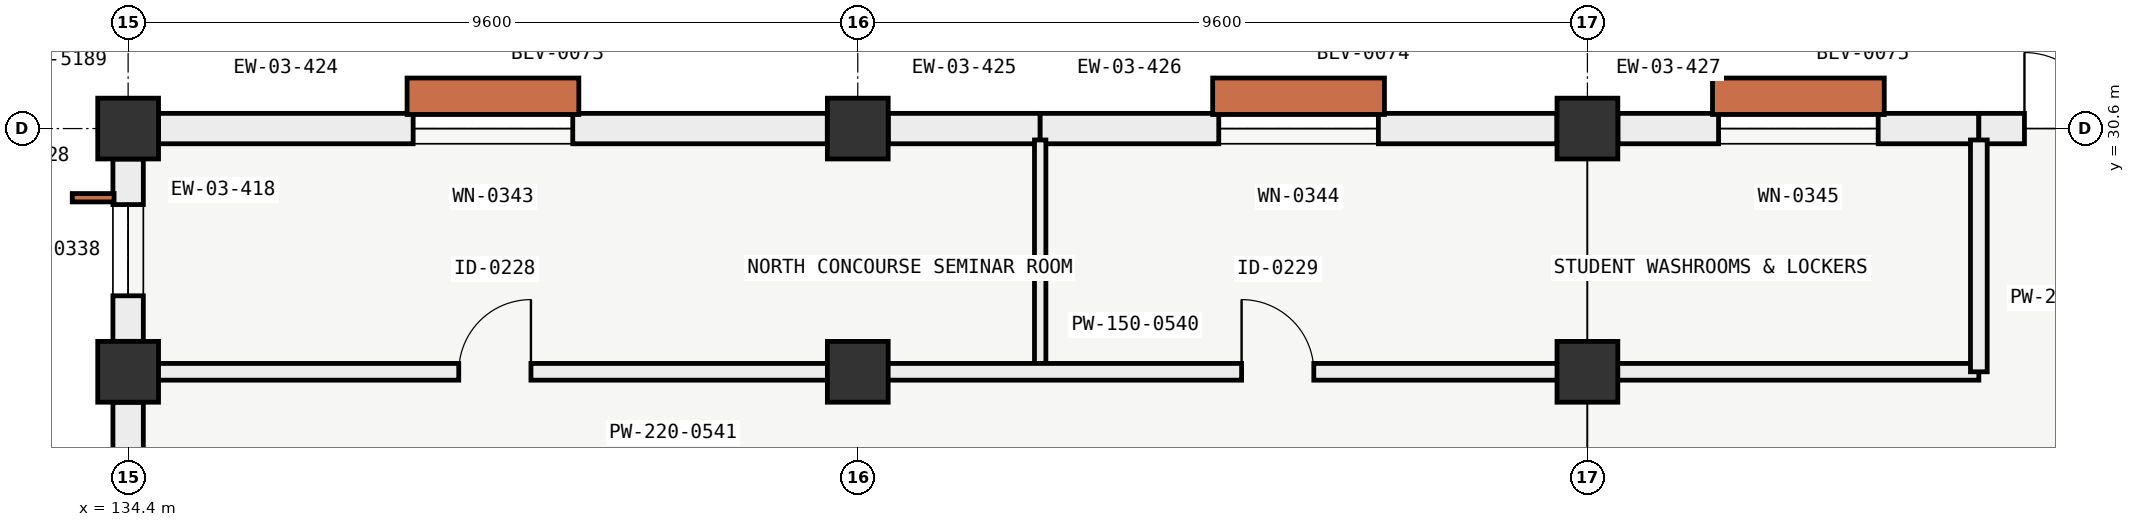
"""IFC4 building model, lengths in metres.
Left out: names, types, materials, properties, quantities, classifications, styles, units other than length and angle.
Written with IfcOpenShell. Run it as: python <this file> out.ifc"""

import sys

from ifc_helpers import new_model, si_unit, direction, frame, frame_2d, origin, origin_2d, place, context, subcontext, project, spatial, rectangle, extrude, element, fill, save


model = new_model("IFC4")
c1 = context("Model", 3, precision=1e-05, world=origin(), true_north=direction((0.0, 1.0)))
c2 = subcontext(c1, "Body", "Model", "MODEL_VIEW")
j1 = project(units=[si_unit("LENGTHUNIT", "METRE"), si_unit("PLANEANGLEUNIT", "RADIAN")], contexts=[c1])
p1 = place(None, origin())
s1 = spatial("IfcSite", under=j1, at=p1, CompositionType="ELEMENT")
p2 = place(p1, origin())
s2 = spatial("IfcBuilding", under=s1, at=p2, CompositionType="ELEMENT")
p3 = place(p2, origin())
s3 = spatial("IfcBuildingStorey", under=s2, at=p3, CompositionType="ELEMENT", Elevation=0.0)
for number, where, z_axis, x_axis in (
    (1, (134.4, 27.4, 0.0), (0.0, 0.0, 1.0), (1.0, 0.0, 0.0)),
    (2, (134.4, 30.6, 0.0), (0.0, 0.0, 1.0), (1.0, 0.0, 0.0)),
    (3, (144.0, 27.4, 0.0), (0.0, 0.0, 1.0), (1.0, 0.0, 0.0)),
    (4, (144.0, 30.6, 0.0), (0.0, 0.0, 1.0), (1.0, 0.0, 0.0)),
    (5, (153.6, 27.4, 0.0), (0.0, 0.0, 1.0), (1.0, 0.0, 0.0)),
    (6, (153.6, 30.6, 0.0), (0.0, 0.0, 1.0), (1.0, 0.0, 0.0)),
):
    element("IfcColumn", number, at=place(p3, frame(where, z_axis=z_axis, x_axis=x_axis)), inside=s3, PredefinedType="COLUMN", context=c2, shape_type="SweptSolid", body=[
        extrude(rectangle(XDim=0.8, YDim=0.8, at=origin_2d()), origin(), (0.0, 0.0, 1.0), 5.4),
    ])
p4 = place(p3, frame((134.4, 24.601, 0.0), z_axis=(0.0, 0.0, 1.0), x_axis=(0.0, 1.0, 0.0)))
e7 = element("IfcWall", 7, at=p4, inside=s3, PredefinedType="SOLIDWALL", context=c2, shape_type="SweptSolid", body=[
    extrude(rectangle(XDim=2.398, YDim=0.4, at=frame_2d((1.199, 0.0))), origin(), (0.0, 0.0, 1.0), 4.45),
])
p5 = place(p3, frame((134.4, 27.801, 0.0), z_axis=(0.0, 0.0, 1.0), x_axis=(0.0, 1.0, 0.0)))
e8 = element("IfcWall", 8, at=p5, inside=s3, PredefinedType="SOLIDWALL", context=c2, shape_type="SweptSolid", body=[
    extrude(rectangle(XDim=2.398, YDim=0.4, at=frame_2d((1.199, 0.0))), origin(), (0.0, 0.0, 1.0), 4.45),
])
p6 = place(p5, frame((0.599, 0.0, 0.9)))
e9 = element("IfcOpeningElement", 9, at=p6, cuts=e8, PredefinedType="OPENING", context=c2, shape_type="SweptSolid", body=[
    extrude(rectangle(XDim=1.2, YDim=1.8, at=frame_2d((0.6, 0.9))), frame((0.0, 0.21, 0.0), z_axis=(0.0, -1.0, 0.0), x_axis=(1.0, 0.0, 0.0)), (0.0, 0.0, 1.0), 0.42),
])
p7 = place(p3, frame((134.801, 30.6, 0.0), z_axis=(0.0, 0.0, 1.0), x_axis=(1.0, 0.0, 0.0)))
e10 = element("IfcWall", 10, at=p7, inside=s3, PredefinedType="SOLIDWALL", context=c2, shape_type="SweptSolid", body=[
    extrude(rectangle(XDim=8.798, YDim=0.4, at=frame_2d((4.399, 0.0))), origin(), (0.0, 0.0, 1.0), 4.45),
])
p8 = place(p7, frame((3.349, 0.0, 0.85)))
e11 = element("IfcOpeningElement", 11, at=p8, cuts=e10, PredefinedType="OPENING", context=c2, shape_type="SweptSolid", body=[
    extrude(rectangle(XDim=2.1, YDim=2.4, at=frame_2d((1.05, 1.2))), frame((0.0, 0.21, 0.0), z_axis=(0.0, -1.0, 0.0), x_axis=(1.0, 0.0, 0.0)), (0.0, 0.0, 1.0), 0.42),
])
p9 = place(p3, frame((144.401, 30.6, 0.0), z_axis=(0.0, 0.0, 1.0), x_axis=(1.0, 0.0, 0.0)))
e12 = element("IfcWall", 12, at=p9, inside=s3, PredefinedType="SOLIDWALL", context=c2, shape_type="SweptSolid", body=[
    extrude(rectangle(XDim=1.999, YDim=0.4, at=frame_2d((1.0, 0.0))), origin(), (0.0, 0.0, 1.0), 4.45),
])
p10 = place(p3, frame((146.4, 30.6, 0.0), z_axis=(0.0, 0.0, 1.0), x_axis=(1.0, 0.0, 0.0)))
e13 = element("IfcWall", 13, at=p10, inside=s3, PredefinedType="SOLIDWALL", context=c2, shape_type="SweptSolid", body=[
    extrude(rectangle(XDim=6.799, YDim=0.4, at=frame_2d((3.399, 0.0))), origin(), (0.0, 0.0, 1.0), 4.45),
])
p11 = place(p10, frame((2.35, 0.0, 0.85)))
e14 = element("IfcOpeningElement", 14, at=p11, cuts=e13, PredefinedType="OPENING", context=c2, shape_type="SweptSolid", body=[
    extrude(rectangle(XDim=2.1, YDim=2.4, at=frame_2d((1.05, 1.2))), frame((0.0, 0.21, 0.0), z_axis=(0.0, -1.0, 0.0), x_axis=(1.0, 0.0, 0.0)), (0.0, 0.0, 1.0), 0.42),
])
p12 = place(p3, frame((154.001, 30.6, 0.0), z_axis=(0.0, 0.0, 1.0), x_axis=(1.0, 0.0, 0.0)))
e15 = element("IfcWall", 15, at=p12, inside=s3, PredefinedType="SOLIDWALL", context=c2, shape_type="SweptSolid", body=[
    extrude(rectangle(XDim=4.749, YDim=0.4, at=frame_2d((2.375, 0.0))), origin(), (0.0, 0.0, 1.0), 4.45),
])
p13 = place(p12, frame((1.324, 0.0, 0.85)))
e16 = element("IfcOpeningElement", 16, at=p13, cuts=e15, PredefinedType="OPENING", context=c2, shape_type="SweptSolid", body=[
    extrude(rectangle(XDim=2.1, YDim=2.4, at=frame_2d((1.05, 1.2))), frame((0.0, 0.21, 0.0), z_axis=(0.0, -1.0, 0.0), x_axis=(1.0, 0.0, 0.0)), (0.0, 0.0, 1.0), 0.42),
])
p14 = place(p3, frame((158.75, 30.6, 0.0), z_axis=(0.0, 0.0, 1.0), x_axis=(1.0, 0.0, 0.0)))
e17 = element("IfcWall", 17, at=p14, inside=s3, PredefinedType="SOLIDWALL", context=c2, shape_type="SweptSolid", body=[
    extrude(rectangle(XDim=3.2, YDim=0.4, at=frame_2d((1.6, 0.0))), origin(), (0.0, 0.0, 1.0), 4.45),
])
p15 = place(p14, frame((0.6, 0.0, 0.0)))
e18 = element("IfcOpeningElement", 18, at=p15, cuts=e17, PredefinedType="OPENING", context=c2, shape_type="SweptSolid", body=[
    extrude(rectangle(XDim=2.0, YDim=2.4, at=frame_2d((1.0, 1.2))), frame((0.0, 0.21, 0.0), z_axis=(0.0, -1.0, 0.0), x_axis=(1.0, 0.0, 0.0)), (0.0, 0.0, 1.0), 0.42),
])
p16 = place(p3, frame((146.4, 27.4, 0.0), z_axis=(0.0, 0.0, 1.0), x_axis=(0.0, 1.0, 0.0)))
e19 = element("IfcWall", 19, at=p16, inside=s3, PredefinedType="PARTITIONING", context=c2, shape_type="SweptSolid", body=[
    extrude(rectangle(XDim=3.05, YDim=0.15, at=frame_2d((1.525, 0.0))), origin(), (0.0, 0.0, 1.0), 5.05),
])
p17 = place(p3, frame((134.55, 27.4, 0.0), z_axis=(0.0, 0.0, 1.0), x_axis=(1.0, 0.0, 0.0)))
e20 = element("IfcWall", 20, at=p17, inside=s3, PredefinedType="PARTITIONING", context=c2, shape_type="SweptSolid", body=[
    extrude(rectangle(XDim=24.2, YDim=0.22, at=frame_2d((12.1, 0.0))), origin(), (0.0, 0.0, 1.0), 4.45),
])
p18 = place(p17, frame((4.2, 0.0, 0.0)))
e21 = element("IfcOpeningElement", 21, at=p18, cuts=e20, PredefinedType="OPENING", context=c2, shape_type="SweptSolid", body=[
    extrude(rectangle(XDim=0.95, YDim=2.1, at=frame_2d((0.475, 1.05))), frame((0.0, 0.12, 0.0), z_axis=(0.0, -1.0, 0.0), x_axis=(1.0, 0.0, 0.0)), (0.0, 0.0, 1.0), 0.24),
])
p19 = place(p17, frame((14.5, 0.0, 0.0)))
e22 = element("IfcOpeningElement", 22, at=p19, cuts=e20, PredefinedType="OPENING", context=c2, shape_type="SweptSolid", body=[
    extrude(rectangle(XDim=0.95, YDim=2.1, at=frame_2d((0.475, 1.05))), frame((0.0, 0.12, 0.0), z_axis=(0.0, -1.0, 0.0), x_axis=(1.0, 0.0, 0.0)), (0.0, 0.0, 1.0), 0.24),
])
p20 = place(p3, frame((158.75, 27.4, 0.0), z_axis=(0.0, 0.0, 1.0), x_axis=(0.0, 1.0, 0.0)))
e23 = element("IfcWall", 23, at=p20, inside=s3, PredefinedType="PARTITIONING", context=c2, shape_type="SweptSolid", body=[
    extrude(rectangle(XDim=3.05, YDim=0.22, at=frame_2d((1.525, 0.0))), origin(), (0.0, 0.0, 1.0), 4.45),
])
p21 = place(p6, origin())
e24 = element("IfcWindow", 24, at=p21, inside=s3, PartitioningType="SINGLE_PANEL", PredefinedType="WINDOW", context=c2, shape_type="SweptSolid", body=[
    extrude(rectangle(XDim=1.2, YDim=1.8, at=frame_2d((0.6, 0.9))), frame((0.0, 0.03, 0.0), z_axis=(0.0, -1.0, 0.0), x_axis=(1.0, 0.0, 0.0)), (0.0, 0.0, 1.0), 0.06),
])
fill(e9, e24)
p22 = place(p8, origin())
e25 = element("IfcWindow", 25, at=p22, inside=s3, PartitioningType="SINGLE_PANEL", PredefinedType="WINDOW", context=c2, shape_type="SweptSolid", body=[
    extrude(rectangle(XDim=2.1, YDim=2.4, at=frame_2d((1.05, 1.2))), frame((0.0, 0.03, 0.0), z_axis=(0.0, -1.0, 0.0), x_axis=(1.0, 0.0, 0.0)), (0.0, 0.0, 1.0), 0.06),
])
fill(e11, e25)
p23 = place(p11, origin())
e26 = element("IfcWindow", 26, at=p23, inside=s3, PartitioningType="SINGLE_PANEL", PredefinedType="WINDOW", context=c2, shape_type="SweptSolid", body=[
    extrude(rectangle(XDim=2.1, YDim=2.4, at=frame_2d((1.05, 1.2))), frame((0.0, 0.03, 0.0), z_axis=(0.0, -1.0, 0.0), x_axis=(1.0, 0.0, 0.0)), (0.0, 0.0, 1.0), 0.06),
])
fill(e14, e26)
p24 = place(p13, origin())
e27 = element("IfcWindow", 27, at=p24, inside=s3, PartitioningType="SINGLE_PANEL", PredefinedType="WINDOW", context=c2, shape_type="SweptSolid", body=[
    extrude(rectangle(XDim=2.1, YDim=2.4, at=frame_2d((1.05, 1.2))), frame((0.0, 0.03, 0.0), z_axis=(0.0, -1.0, 0.0), x_axis=(1.0, 0.0, 0.0)), (0.0, 0.0, 1.0), 0.06),
])
fill(e16, e27)
p25 = place(p15, origin())
e28 = element("IfcDoor", 28, at=p25, inside=s3, OperationType="DOUBLE_DOOR_SINGLE_SWING", PredefinedType="DOOR", context=c2, shape_type="SweptSolid", body=[
    extrude(rectangle(XDim=2.0, YDim=2.4, at=frame_2d((1.0, 1.2))), frame((0.0, 0.025, 0.0), z_axis=(0.0, -1.0, 0.0), x_axis=(1.0, 0.0, 0.0)), (0.0, 0.0, 1.0), 0.05),
])
fill(e18, e28)
p26 = place(p18, origin())
e29 = element("IfcDoor", 29, at=p26, inside=s3, OperationType="SINGLE_SWING_RIGHT", PredefinedType="DOOR", context=c2, shape_type="SweptSolid", body=[
    extrude(rectangle(XDim=0.95, YDim=2.1, at=frame_2d((0.475, 1.05))), frame((0.0, 0.025, 0.0), z_axis=(0.0, -1.0, 0.0), x_axis=(1.0, 0.0, 0.0)), (0.0, 0.0, 1.0), 0.05),
])
fill(e21, e29)
p27 = place(p19, origin())
e30 = element("IfcDoor", 30, at=p27, inside=s3, OperationType="SINGLE_SWING_LEFT", PredefinedType="DOOR", context=c2, shape_type="SweptSolid", body=[
    extrude(rectangle(XDim=0.95, YDim=2.1, at=frame_2d((0.475, 1.05))), frame((0.0, 0.025, 0.0), z_axis=(0.0, -1.0, 0.0), x_axis=(1.0, 0.0, 0.0)), (0.0, 0.0, 1.0), 0.05),
])
fill(e22, e30)
save(model, sys.argv[1])
